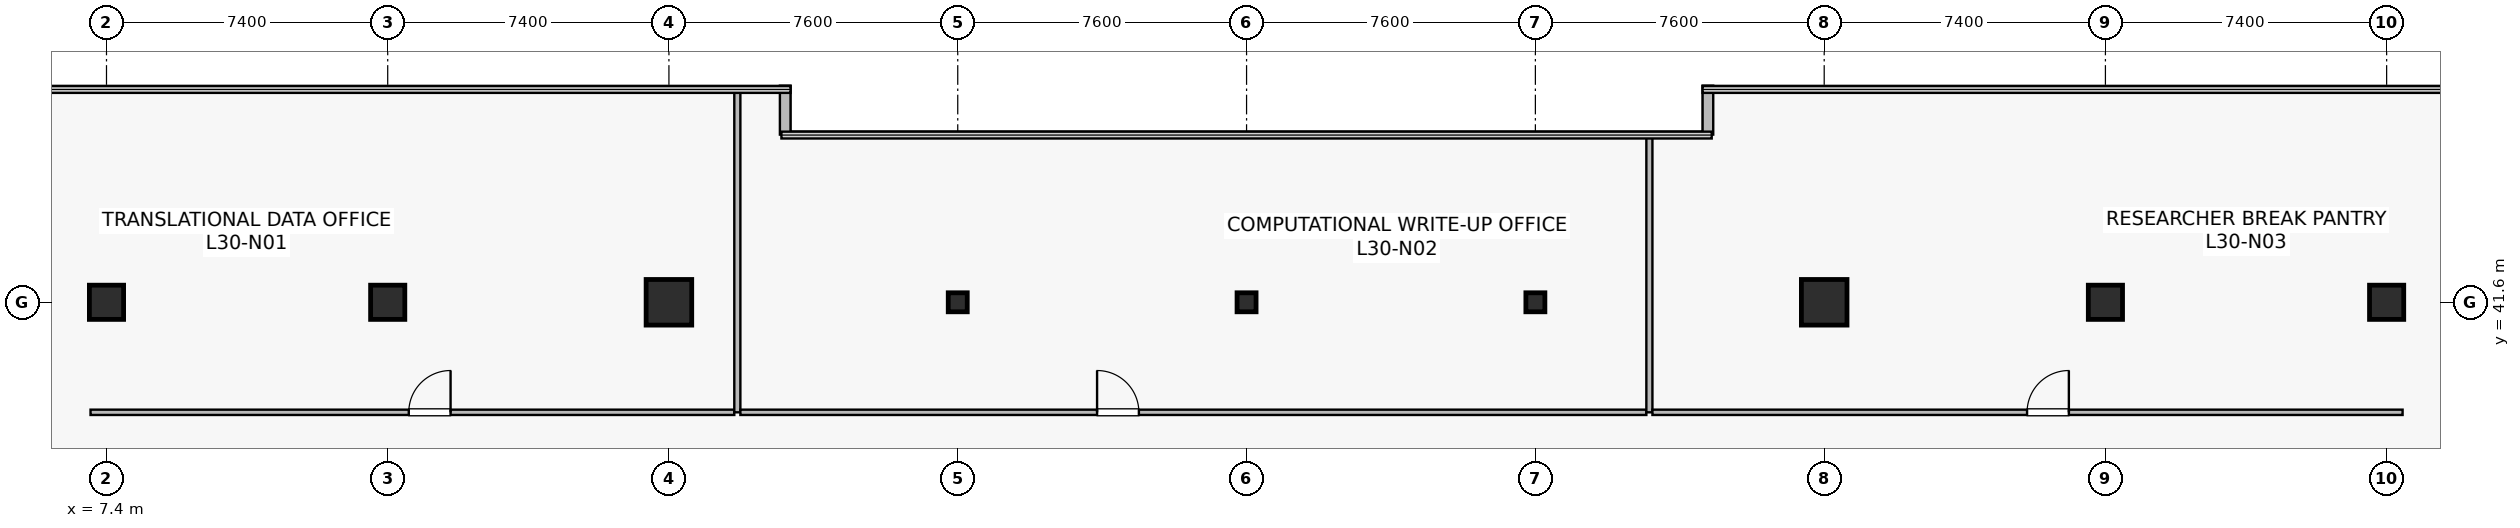
"""IFC4 building model, lengths in metres.
Left out: names, types, materials, properties, quantities, classifications, styles, units other than length and angle.
Written with IfcOpenShell. Run it as: python <this file> out.ifc"""

import sys

from ifc_helpers import new_model, si_unit, direction, frame, frame_2d, origin, origin_2d, place, context, subcontext, project, spatial, rectangle, hollow_rectangle, extrude, source, transform, mapped, element, fill, save


model = new_model("IFC4")
c1 = context("Model", 3, precision=1e-05, world=origin(), true_north=direction((0.0, 1.0)))
c2 = subcontext(c1, "Body", "Model", "MODEL_VIEW")
j1 = project(units=[si_unit("LENGTHUNIT", "METRE"), si_unit("PLANEANGLEUNIT", "RADIAN")], contexts=[c1])
p1 = place(None, origin())
s1 = spatial("IfcSite", under=j1, at=p1, CompositionType="ELEMENT")
p2 = place(p1, origin())
s2 = spatial("IfcBuilding", under=s1, at=p2, CompositionType="ELEMENT")
p3 = place(p2, frame((0.0, 0.0, 125.6)))
s3 = spatial("IfcBuildingStorey", under=s2, at=p3, CompositionType="ELEMENT", Elevation=125.6)
m1 = source(origin(), c2, "Body", "SweptSolid", [
    extrude(rectangle(XDim=0.9, YDim=0.9, at=origin_2d()), origin(), (0.0, 0.0, 1.0), 4.1),
])
p4 = place(p3, frame((14.8, 41.6, 0.0), z_axis=(0.0, 0.0, 1.0), x_axis=(1.0, 0.0, 0.0)))
e1 = element("IfcColumn", 1, at=p4, inside=s3, PredefinedType="COLUMN", context=c2, shape_type="MappedRepresentation", body=[
    mapped(m1, transform((0.0, 0.0, 0.0), scale=1.0)),
])
m2 = source(origin(), c2, "Body", "SweptSolid", [
    extrude(rectangle(XDim=1.2, YDim=1.2, at=origin_2d()), origin(), (0.0, 0.0, 1.0), 4.1),
])
for number, where, z_axis, x_axis in (
    (2, (22.2, 41.6, 0.0), (0.0, 0.0, 1.0), (1.0, 0.0, 0.0)),
    (3, (52.6, 41.6, 0.0), (0.0, 0.0, 1.0), (1.0, 0.0, 0.0)),
):
    element("IfcColumn", number, at=place(p3, frame(where, z_axis=z_axis, x_axis=x_axis)), inside=s3, PredefinedType="COLUMN", context=c2, shape_type="MappedRepresentation", body=[
        mapped(m2, transform((0.0, 0.0, 0.0), scale=1.0)),
    ])
for number, where, z_axis, x_axis in (
    (4, (60.0, 41.6, 0.0), (0.0, 0.0, 1.0), (1.0, 0.0, 0.0)),
    (5, (7.4, 41.6, 0.0), (0.0, 0.0, 1.0), (1.0, 0.0, 0.0)),
    (6, (67.4, 41.6, 0.0), (0.0, 0.0, 1.0), (1.0, 0.0, 0.0)),
):
    element("IfcColumn", number, at=place(p3, frame(where, z_axis=z_axis, x_axis=x_axis)), inside=s3, PredefinedType="COLUMN", context=c2, shape_type="MappedRepresentation", body=[
        mapped(m1, transform((0.0, 0.0, 0.0), scale=1.0)),
    ])
m3 = source(origin(), c2, "Body", "SweptSolid", [
    extrude(hollow_rectangle(XDim=0.5, YDim=0.5, WallThickness=0.022, at=origin_2d()), origin(), (0.0, 0.0, 1.0), 4.1),
])
for number, where, z_axis, x_axis in (
    (7, (29.8, 41.6, 0.0), (0.0, 0.0, 1.0), (1.0, 0.0, 0.0)),
    (8, (37.4, 41.6, 0.0), (0.0, 0.0, 1.0), (1.0, 0.0, 0.0)),
    (9, (45.0, 41.6, 0.0), (0.0, 0.0, 1.0), (1.0, 0.0, 0.0)),
):
    element("IfcColumn", number, at=place(p3, frame(where, z_axis=z_axis, x_axis=x_axis)), inside=s3, PredefinedType="COLUMN", context=c2, shape_type="MappedRepresentation", body=[
        mapped(m3, transform((0.0, 0.0, 0.0), scale=1.0)),
    ])
for number, where, z_axis, x_axis in (
    (10, (49.54, 47.3, 0.0), (0.0, 0.0, 1.0), (0.0, -1.0, 0.0)),
    (11, (25.26, 46.012, 0.0), (0.0, 0.0, 1.0), (0.0, 1.0, 0.0)),
):
    element("IfcWall", number, at=place(p3, frame(where, z_axis=z_axis, x_axis=x_axis)), inside=s3, PredefinedType="STANDARD", context=c2, shape_type="SweptSolid", body=[
        extrude(rectangle(XDim=1.288, YDim=0.28, at=frame_2d((0.644, 0.0))), origin(), (0.0, 0.0, 1.0), 3.79),
    ])
p5 = place(p3, frame((6.98, 38.705, 0.0), z_axis=(0.0, 0.0, 1.0), x_axis=(1.0, 0.0, 0.0)))
e12 = element("IfcWall", 12, at=p5, inside=s3, PredefinedType="PARTITIONING", context=c2, shape_type="SweptSolid", body=[
    extrude(rectangle(XDim=16.94, YDim=0.14, at=frame_2d((8.47, 0.0))), origin(), (0.0, 0.0, 1.0), 3.125),
])
p6 = place(p5, frame((8.374, 0.0, 0.0)))
e13 = element("IfcOpeningElement", 13, at=p6, cuts=e12, PredefinedType="OPENING", context=c2, shape_type="SweptSolid", body=[
    extrude(rectangle(XDim=1.1, YDim=2.18, at=frame_2d((0.55, 1.09))), frame((0.0, 0.08, 0.0), z_axis=(0.0, -1.0, 0.0), x_axis=(1.0, 0.0, 0.0)), (0.0, 0.0, 1.0), 0.16),
])
p7 = place(p3, frame((24.0, 38.705, 0.0), z_axis=(0.0, 0.0, 1.0), x_axis=(0.0, 1.0, 0.0)))
e14 = element("IfcWall", 14, at=p7, inside=s3, PredefinedType="PARTITIONING", context=c2, shape_type="SweptSolid", body=[
    extrude(rectangle(XDim=8.485, YDim=0.16, at=frame_2d((4.242, 0.0))), origin(), (0.0, 0.0, 1.0), 3.075),
])
p8 = place(p3, frame((24.08, 38.705, 0.0), z_axis=(0.0, 0.0, 1.0), x_axis=(1.0, 0.0, 0.0)))
e15 = element("IfcWall", 15, at=p8, inside=s3, PredefinedType="PARTITIONING", context=c2, shape_type="SweptSolid", body=[
    extrude(rectangle(XDim=23.84, YDim=0.14, at=frame_2d((11.92, 0.0))), origin(), (0.0, 0.0, 1.0), 3.125),
])
p9 = place(p8, frame((9.386, 0.0, 0.0)))
e16 = element("IfcOpeningElement", 16, at=p9, cuts=e15, PredefinedType="OPENING", context=c2, shape_type="SweptSolid", body=[
    extrude(rectangle(XDim=1.1, YDim=2.18, at=frame_2d((0.55, 1.09))), frame((0.0, 0.08, 0.0), z_axis=(0.0, -1.0, 0.0), x_axis=(1.0, 0.0, 0.0)), (0.0, 0.0, 1.0), 0.16),
])
p10 = place(p3, frame((48.0, 38.705, 0.0), z_axis=(0.0, 0.0, 1.0), x_axis=(0.0, 1.0, 0.0)))
e17 = element("IfcWall", 17, at=p10, inside=s3, PredefinedType="PARTITIONING", context=c2, shape_type="SweptSolid", body=[
    extrude(rectangle(XDim=7.285, YDim=0.16, at=frame_2d((3.643, 0.0))), origin(), (0.0, 0.0, 1.0), 3.075),
])
p11 = place(p3, frame((48.08, 38.705, 0.0), z_axis=(0.0, 0.0, 1.0), x_axis=(1.0, 0.0, 0.0)))
e18 = element("IfcWall", 18, at=p11, inside=s3, PredefinedType="PARTITIONING", context=c2, shape_type="SweptSolid", body=[
    extrude(rectangle(XDim=19.74, YDim=0.14, at=frame_2d((9.87, 0.0))), origin(), (0.0, 0.0, 1.0), 3.125),
])
p12 = place(p11, frame((9.858, 0.0, 0.0)))
e19 = element("IfcOpeningElement", 19, at=p12, cuts=e18, PredefinedType="OPENING", context=c2, shape_type="SweptSolid", body=[
    extrude(rectangle(XDim=1.1, YDim=2.18, at=frame_2d((0.55, 1.09))), frame((0.0, 0.08, 0.0), z_axis=(0.0, -1.0, 0.0), x_axis=(1.0, 0.0, 0.0)), (0.0, 0.0, 1.0), 0.16),
])
m4 = source(origin(), c2, "Body", "SweptSolid", [
    extrude(rectangle(XDim=1.1, YDim=2.18, at=frame_2d((0.55, 1.09))), frame((0.0, 0.025, 0.0), z_axis=(0.0, -1.0, 0.0), x_axis=(1.0, 0.0, 0.0)), (0.0, 0.0, 1.0), 0.05),
])
p13 = place(p6, origin())
e20 = element("IfcDoor", 20, at=p13, inside=s3, OperationType="SINGLE_SWING_RIGHT", PredefinedType="DOOR", context=c2, shape_type="MappedRepresentation", body=[
    mapped(m4, transform((0.0, 0.0, 0.0), scale=1.0)),
])
fill(e13, e20)
p14 = place(p9, origin())
e21 = element("IfcDoor", 21, at=p14, inside=s3, OperationType="SINGLE_SWING_LEFT", PredefinedType="DOOR", context=c2, shape_type="MappedRepresentation", body=[
    mapped(m4, transform((0.0, 0.0, 0.0), scale=1.0)),
])
fill(e16, e21)
p15 = place(p12, origin())
e22 = element("IfcDoor", 22, at=p15, inside=s3, OperationType="SINGLE_SWING_RIGHT", PredefinedType="DOOR", context=c2, shape_type="MappedRepresentation", body=[
    mapped(m4, transform((0.0, 0.0, 0.0), scale=1.0)),
])
fill(e19, e22)
save(model, sys.argv[1])
